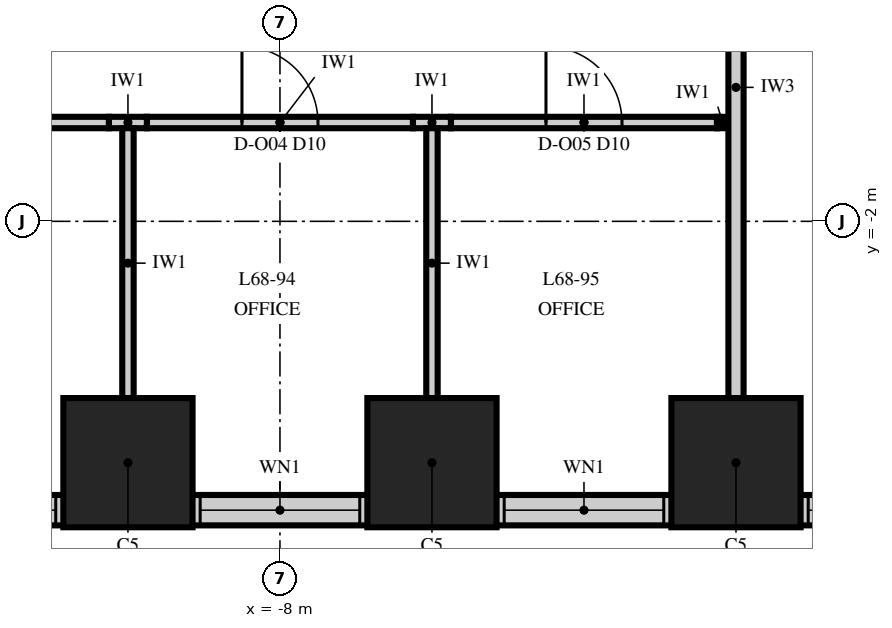
"""IFC4 building model, lengths in metres.
Left out: names, types, materials, properties, quantities, classifications, styles, units other than length and angle.
Written with IfcOpenShell. Run it as: python <this file> out.ifc"""

import sys

from ifc_helpers import new_model, si_unit, direction, frame, frame_2d, origin, origin_2d, place, context, subcontext, project, spatial, rectangle, extrude, element, fill, save


model = new_model("IFC4")
c1 = context("Model", 3, precision=1e-05, world=origin(), true_north=direction((0.0, 1.0)))
c2 = subcontext(c1, "Body", "Model", "MODEL_VIEW")
j1 = project(units=[si_unit("LENGTHUNIT", "METRE"), si_unit("PLANEANGLEUNIT", "RADIAN")], contexts=[c1])
p1 = place(None, origin())
s1 = spatial("IfcSite", under=j1, at=p1, CompositionType="ELEMENT")
p2 = place(p1, origin())
s2 = spatial("IfcBuilding", under=s1, at=p2, CompositionType="ELEMENT")
p3 = place(p2, frame((0.0, 0.0, 292.0)))
s3 = spatial("IfcBuildingStorey", under=s2, at=p3, CompositionType="ELEMENT", Elevation=292.0)
for number, where, z_axis, x_axis in (
    (1, (-10.0, -5.175, 0.0), (0.0, 0.0, 1.0), (1.0, 0.0, 0.0)),
    (2, (-6.0, -5.175, 0.0), (0.0, 0.0, 1.0), (1.0, 0.0, 0.0)),
    (3, (-2.0, -5.175, 0.0), (0.0, 0.0, 1.0), (1.0, 0.0, 0.0)),
):
    element("IfcColumn", number, at=place(p3, frame(where, z_axis=z_axis, x_axis=x_axis)), inside=s3, PredefinedType="COLUMN", context=c2, shape_type="SweptSolid", body=[
        extrude(rectangle(XDim=1.7, YDim=1.7, at=origin_2d()), origin(), (0.0, 0.0, 1.0), 3.75),
    ])
p4 = place(p3, frame((-26.0, -5.8, 0.0), z_axis=(0.0, 0.0, 1.0), x_axis=(1.0, 0.0, 0.0)))
e4 = element("IfcWall", 4, at=p4, inside=s3, PredefinedType="SOLIDWALL", context=c2, shape_type="SweptSolid", body=[
    extrude(rectangle(XDim=52.0, YDim=0.4, at=frame_2d((26.0, 0.0))), origin(), (0.0, 0.0, 1.0), 2.0),
])
p5 = place(p4, frame((0.95, 0.0, 0.8)))
e5 = element("IfcOpeningElement", 5, at=p5, cuts=e4, PredefinedType="OPENING", context=c2, shape_type="SweptSolid", body=[
    extrude(rectangle(XDim=2.1, YDim=1.15, at=frame_2d((1.05, 0.575))), frame((0.0, 0.215, 0.0), z_axis=(0.0, -1.0, 0.0), x_axis=(1.0, 0.0, 0.0)), (0.0, 0.0, 1.0), 0.43),
])
p6 = place(p4, frame((4.95, 0.0, 0.8)))
e6 = element("IfcOpeningElement", 6, at=p6, cuts=e4, PredefinedType="OPENING", context=c2, shape_type="SweptSolid", body=[
    extrude(rectangle(XDim=2.1, YDim=1.15, at=frame_2d((1.05, 0.575))), frame((0.0, 0.215, 0.0), z_axis=(0.0, -1.0, 0.0), x_axis=(1.0, 0.0, 0.0)), (0.0, 0.0, 1.0), 0.43),
])
p7 = place(p4, frame((8.95, 0.0, 0.8)))
e7 = element("IfcOpeningElement", 7, at=p7, cuts=e4, PredefinedType="OPENING", context=c2, shape_type="SweptSolid", body=[
    extrude(rectangle(XDim=2.1, YDim=1.15, at=frame_2d((1.05, 0.575))), frame((0.0, 0.215, 0.0), z_axis=(0.0, -1.0, 0.0), x_axis=(1.0, 0.0, 0.0)), (0.0, 0.0, 1.0), 0.43),
])
p8 = place(p4, frame((12.95, 0.0, 0.8)))
e8 = element("IfcOpeningElement", 8, at=p8, cuts=e4, PredefinedType="OPENING", context=c2, shape_type="SweptSolid", body=[
    extrude(rectangle(XDim=2.1, YDim=1.15, at=frame_2d((1.05, 0.575))), frame((0.0, 0.215, 0.0), z_axis=(0.0, -1.0, 0.0), x_axis=(1.0, 0.0, 0.0)), (0.0, 0.0, 1.0), 0.43),
])
p9 = place(p4, frame((16.95, 0.0, 0.8)))
e9 = element("IfcOpeningElement", 9, at=p9, cuts=e4, PredefinedType="OPENING", context=c2, shape_type="SweptSolid", body=[
    extrude(rectangle(XDim=2.1, YDim=1.15, at=frame_2d((1.05, 0.575))), frame((0.0, 0.215, 0.0), z_axis=(0.0, -1.0, 0.0), x_axis=(1.0, 0.0, 0.0)), (0.0, 0.0, 1.0), 0.43),
])
p10 = place(p4, frame((20.95, 0.0, 0.8)))
e10 = element("IfcOpeningElement", 10, at=p10, cuts=e4, PredefinedType="OPENING", context=c2, shape_type="SweptSolid", body=[
    extrude(rectangle(XDim=2.1, YDim=1.15, at=frame_2d((1.05, 0.575))), frame((0.0, 0.215, 0.0), z_axis=(0.0, -1.0, 0.0), x_axis=(1.0, 0.0, 0.0)), (0.0, 0.0, 1.0), 0.43),
])
p11 = place(p4, frame((24.95, 0.0, 0.8)))
e11 = element("IfcOpeningElement", 11, at=p11, cuts=e4, PredefinedType="OPENING", context=c2, shape_type="SweptSolid", body=[
    extrude(rectangle(XDim=2.1, YDim=1.15, at=frame_2d((1.05, 0.575))), frame((0.0, 0.215, 0.0), z_axis=(0.0, -1.0, 0.0), x_axis=(1.0, 0.0, 0.0)), (0.0, 0.0, 1.0), 0.43),
])
p12 = place(p4, frame((28.95, 0.0, 0.8)))
e12 = element("IfcOpeningElement", 12, at=p12, cuts=e4, PredefinedType="OPENING", context=c2, shape_type="SweptSolid", body=[
    extrude(rectangle(XDim=2.1, YDim=1.15, at=frame_2d((1.05, 0.575))), frame((0.0, 0.215, 0.0), z_axis=(0.0, -1.0, 0.0), x_axis=(1.0, 0.0, 0.0)), (0.0, 0.0, 1.0), 0.43),
])
p13 = place(p4, frame((32.95, 0.0, 0.8)))
e13 = element("IfcOpeningElement", 13, at=p13, cuts=e4, PredefinedType="OPENING", context=c2, shape_type="SweptSolid", body=[
    extrude(rectangle(XDim=2.1, YDim=1.15, at=frame_2d((1.05, 0.575))), frame((0.0, 0.215, 0.0), z_axis=(0.0, -1.0, 0.0), x_axis=(1.0, 0.0, 0.0)), (0.0, 0.0, 1.0), 0.43),
])
p14 = place(p4, frame((36.95, 0.0, 0.8)))
e14 = element("IfcOpeningElement", 14, at=p14, cuts=e4, PredefinedType="OPENING", context=c2, shape_type="SweptSolid", body=[
    extrude(rectangle(XDim=2.1, YDim=1.15, at=frame_2d((1.05, 0.575))), frame((0.0, 0.215, 0.0), z_axis=(0.0, -1.0, 0.0), x_axis=(1.0, 0.0, 0.0)), (0.0, 0.0, 1.0), 0.43),
])
p15 = place(p4, frame((40.95, 0.0, 0.8)))
e15 = element("IfcOpeningElement", 15, at=p15, cuts=e4, PredefinedType="OPENING", context=c2, shape_type="SweptSolid", body=[
    extrude(rectangle(XDim=2.1, YDim=1.15, at=frame_2d((1.05, 0.575))), frame((0.0, 0.215, 0.0), z_axis=(0.0, -1.0, 0.0), x_axis=(1.0, 0.0, 0.0)), (0.0, 0.0, 1.0), 0.43),
])
p16 = place(p4, frame((44.95, 0.0, 0.8)))
e16 = element("IfcOpeningElement", 16, at=p16, cuts=e4, PredefinedType="OPENING", context=c2, shape_type="SweptSolid", body=[
    extrude(rectangle(XDim=2.1, YDim=1.15, at=frame_2d((1.05, 0.575))), frame((0.0, 0.215, 0.0), z_axis=(0.0, -1.0, 0.0), x_axis=(1.0, 0.0, 0.0)), (0.0, 0.0, 1.0), 0.43),
])
p17 = place(p4, frame((48.95, 0.0, 0.8)))
e17 = element("IfcOpeningElement", 17, at=p17, cuts=e4, PredefinedType="OPENING", context=c2, shape_type="SweptSolid", body=[
    extrude(rectangle(XDim=2.1, YDim=1.15, at=frame_2d((1.05, 0.575))), frame((0.0, 0.215, 0.0), z_axis=(0.0, -1.0, 0.0), x_axis=(1.0, 0.0, 0.0)), (0.0, 0.0, 1.0), 0.43),
])
p18 = place(p3, frame((-13.75, -0.7, 0.0), z_axis=(0.0, 0.0, 1.0), x_axis=(1.0, 0.0, 0.0)))
e18 = element("IfcWall", 18, at=p18, inside=s3, PredefinedType="PARTITIONING", context=c2, shape_type="SweptSolid", body=[
    extrude(rectangle(XDim=3.5, YDim=0.15, at=frame_2d((1.75, 0.0))), origin(), (0.0, 0.0, 1.0), 3.85),
])
p19 = place(p18, frame((1.25, 0.0, 0.0)))
e19 = element("IfcOpeningElement", 19, at=p19, cuts=e18, PredefinedType="OPENING", context=c2, shape_type="SweptSolid", body=[
    extrude(rectangle(XDim=1.0, YDim=2.3, at=frame_2d((0.5, 1.15))), frame((0.0, 0.09, 0.0), z_axis=(0.0, -1.0, 0.0), x_axis=(1.0, 0.0, 0.0)), (0.0, 0.0, 1.0), 0.18),
])
p20 = place(p3, frame((-10.25, -0.7, 0.0), z_axis=(0.0, 0.0, 1.0), x_axis=(1.0, 0.0, 0.0)))
e20 = element("IfcWall", 20, at=p20, inside=s3, PredefinedType="PARTITIONING", context=c2, shape_type="SweptSolid", body=[
    extrude(rectangle(XDim=0.5, YDim=0.15, at=frame_2d((0.25, 0.0))), origin(), (0.0, 0.0, 1.0), 2.15),
])
p21 = place(p3, frame((-9.75, -0.7, 0.0), z_axis=(0.0, 0.0, 1.0), x_axis=(1.0, 0.0, 0.0)))
e21 = element("IfcWall", 21, at=p21, inside=s3, PredefinedType="PARTITIONING", context=c2, shape_type="SweptSolid", body=[
    extrude(rectangle(XDim=3.5, YDim=0.15, at=frame_2d((1.75, 0.0))), origin(), (0.0, 0.0, 1.0), 3.85),
])
p22 = place(p21, frame((1.25, 0.0, 0.0)))
e22 = element("IfcOpeningElement", 22, at=p22, cuts=e21, PredefinedType="OPENING", context=c2, shape_type="SweptSolid", body=[
    extrude(rectangle(XDim=1.0, YDim=2.3, at=frame_2d((0.5, 1.15))), frame((0.0, 0.09, 0.0), z_axis=(0.0, -1.0, 0.0), x_axis=(1.0, 0.0, 0.0)), (0.0, 0.0, 1.0), 0.18),
])
p23 = place(p3, frame((-6.25, -0.7, 0.0), z_axis=(0.0, 0.0, 1.0), x_axis=(1.0, 0.0, 0.0)))
e23 = element("IfcWall", 23, at=p23, inside=s3, PredefinedType="PARTITIONING", context=c2, shape_type="SweptSolid", body=[
    extrude(rectangle(XDim=0.5, YDim=0.15, at=frame_2d((0.25, 0.0))), origin(), (0.0, 0.0, 1.0), 2.15),
])
p24 = place(p3, frame((-5.75, -0.7, 0.0), z_axis=(0.0, 0.0, 1.0), x_axis=(1.0, 0.0, 0.0)))
e24 = element("IfcWall", 24, at=p24, inside=s3, PredefinedType="PARTITIONING", context=c2, shape_type="SweptSolid", body=[
    extrude(rectangle(XDim=3.5, YDim=0.15, at=frame_2d((1.75, 0.0))), origin(), (0.0, 0.0, 1.0), 3.85),
])
p25 = place(p24, frame((1.25, 0.0, 0.0)))
e25 = element("IfcOpeningElement", 25, at=p25, cuts=e24, PredefinedType="OPENING", context=c2, shape_type="SweptSolid", body=[
    extrude(rectangle(XDim=1.0, YDim=2.3, at=frame_2d((0.5, 1.15))), frame((0.0, 0.09, 0.0), z_axis=(0.0, -1.0, 0.0), x_axis=(1.0, 0.0, 0.0)), (0.0, 0.0, 1.0), 0.18),
])
p26 = place(p3, frame((-2.25, -0.7, 0.0), z_axis=(0.0, 0.0, 1.0), x_axis=(1.0, 0.0, 0.0)))
e26 = element("IfcWall", 26, at=p26, inside=s3, PredefinedType="PARTITIONING", context=c2, shape_type="SweptSolid", body=[
    extrude(rectangle(XDim=0.15, YDim=0.15, at=frame_2d((0.075, 0.0))), origin(), (0.0, 0.0, 1.0), 2.15),
])
for number, where, z_axis, x_axis in (
    (27, (-10.0, -4.325, 0.0), (0.0, 0.0, 1.0), (0.0, 1.0, 0.0)),
    (28, (-6.0, -4.325, 0.0), (0.0, 0.0, 1.0), (0.0, 1.0, 0.0)),
):
    element("IfcWall", number, at=place(p3, frame(where, z_axis=z_axis, x_axis=x_axis)), inside=s3, PredefinedType="PARTITIONING", context=c2, shape_type="SweptSolid", body=[
        extrude(rectangle(XDim=3.55, YDim=0.15, at=frame_2d((1.775, 0.0))), origin(), (0.0, 0.0, 1.0), 2.15),
    ])
p27 = place(p3, frame((-2.0, -4.325, 0.0), z_axis=(0.0, 0.0, 1.0), x_axis=(0.0, 1.0, 0.0)))
e29 = element("IfcWall", 29, at=p27, inside=s3, PredefinedType="PARTITIONING", context=c2, shape_type="SweptSolid", body=[
    extrude(rectangle(XDim=8.175, YDim=0.2, at=frame_2d((4.087, 0.0))), origin(), (0.0, 0.0, 1.0), 2.15),
])
p28 = place(p8, origin())
e30 = element("IfcWindow", 30, at=p28, inside=s3, PartitioningType="SINGLE_PANEL", PredefinedType="WINDOW", context=c2, shape_type="SweptSolid", body=[
    extrude(rectangle(XDim=2.1, YDim=1.15, at=frame_2d((1.05, 0.575))), frame((0.0, 0.03, 0.0), z_axis=(0.0, -1.0, 0.0), x_axis=(1.0, 0.0, 0.0)), (0.0, 0.0, 1.0), 0.06),
])
fill(e8, e30)
p29 = place(p9, origin())
e31 = element("IfcWindow", 31, at=p29, inside=s3, PartitioningType="SINGLE_PANEL", PredefinedType="WINDOW", context=c2, shape_type="SweptSolid", body=[
    extrude(rectangle(XDim=2.1, YDim=1.15, at=frame_2d((1.05, 0.575))), frame((0.0, 0.03, 0.0), z_axis=(0.0, -1.0, 0.0), x_axis=(1.0, 0.0, 0.0)), (0.0, 0.0, 1.0), 0.06),
])
fill(e9, e31)
p30 = place(p10, origin())
e32 = element("IfcWindow", 32, at=p30, inside=s3, PartitioningType="SINGLE_PANEL", PredefinedType="WINDOW", context=c2, shape_type="SweptSolid", body=[
    extrude(rectangle(XDim=2.1, YDim=1.15, at=frame_2d((1.05, 0.575))), frame((0.0, 0.03, 0.0), z_axis=(0.0, -1.0, 0.0), x_axis=(1.0, 0.0, 0.0)), (0.0, 0.0, 1.0), 0.06),
])
fill(e10, e32)
p31 = place(p11, origin())
e33 = element("IfcWindow", 33, at=p31, inside=s3, PartitioningType="SINGLE_PANEL", PredefinedType="WINDOW", context=c2, shape_type="SweptSolid", body=[
    extrude(rectangle(XDim=2.1, YDim=1.15, at=frame_2d((1.05, 0.575))), frame((0.0, 0.03, 0.0), z_axis=(0.0, -1.0, 0.0), x_axis=(1.0, 0.0, 0.0)), (0.0, 0.0, 1.0), 0.06),
])
fill(e11, e33)
p32 = place(p22, origin())
e34 = element("IfcDoor", 34, at=p32, inside=s3, OperationType="SINGLE_SWING_LEFT", PredefinedType="DOOR", context=c2, shape_type="SweptSolid", body=[
    extrude(rectangle(XDim=1.0, YDim=2.3, at=frame_2d((0.5, 1.15))), frame((0.0, 0.075, 0.0), z_axis=(0.0, -1.0, 0.0), x_axis=(1.0, 0.0, 0.0)), (0.0, 0.0, 1.0), 0.149),
])
fill(e22, e34)
p33 = place(p25, origin())
e35 = element("IfcDoor", 35, at=p33, inside=s3, OperationType="SINGLE_SWING_LEFT", PredefinedType="DOOR", context=c2, shape_type="SweptSolid", body=[
    extrude(rectangle(XDim=1.0, YDim=2.3, at=frame_2d((0.5, 1.15))), frame((0.0, 0.075, 0.0), z_axis=(0.0, -1.0, 0.0), x_axis=(1.0, 0.0, 0.0)), (0.0, 0.0, 1.0), 0.149),
])
fill(e25, e35)
save(model, sys.argv[1])
